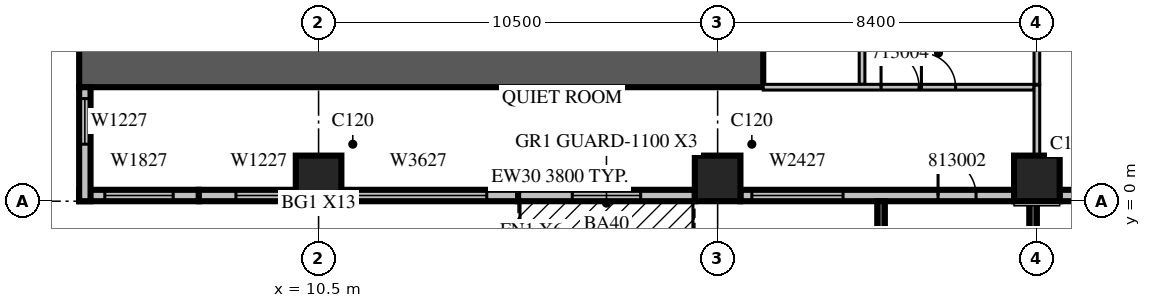
"""IFC4 building model, lengths in metres.
Left out: names, types, materials, properties, quantities, classifications, styles, units other than length and angle.
Written with IfcOpenShell. Run it as: python <this file> out.ifc"""

import sys

from ifc_helpers import new_model, si_unit, direction, frame, frame_2d, origin, origin_2d, place, context, subcontext, project, spatial, rectangle, extrude, source, transform, mapped, element, fill, save


model = new_model("IFC4")
c1 = context("Model", 3, precision=1e-05, world=origin(), true_north=direction((0.0, 1.0)))
c2 = subcontext(c1, "Body", "Model", "MODEL_VIEW")
j1 = project(units=[si_unit("LENGTHUNIT", "METRE"), si_unit("PLANEANGLEUNIT", "RADIAN")], contexts=[c1])
p1 = place(None, origin())
s1 = spatial("IfcSite", under=j1, at=p1, CompositionType="ELEMENT")
p2 = place(p1, origin())
s2 = spatial("IfcBuilding", under=s1, at=p2, CompositionType="ELEMENT")
p3 = place(p2, frame((0.0, 0.0, 65.7)))
s3 = spatial("IfcBuildingStorey", under=s2, at=p3, CompositionType="ELEMENT", Elevation=65.7)
m1 = source(origin(), c2, "Body", "SweptSolid", [
    extrude(rectangle(XDim=1.2, YDim=1.2, at=origin_2d()), origin(), (0.0, 0.0, 1.0), 4.2),
])
for number, where, z_axis, x_axis in (
    (1, (10.5, 0.6, 0.0), (0.0, 0.0, 1.0), (1.0, 0.0, 0.0)),
    (2, (21.0, 0.6, 0.0), (0.0, 0.0, 1.0), (1.0, 0.0, 0.0)),
    (3, (29.4, 0.6, 0.0), (0.0, 0.0, 1.0), (1.0, 0.0, 0.0)),
):
    element("IfcColumn", number, at=place(p3, frame(where, z_axis=z_axis, x_axis=x_axis)), inside=s3, PredefinedType="COLUMN", context=c2, shape_type="MappedRepresentation", body=[
        mapped(m1, transform((0.0, 0.0, 0.0), scale=1.0)),
    ])
m2 = source(origin(), c2, "Body", "SweptSolid", [
    extrude(rectangle(XDim=18.0, YDim=1.2, at=frame_2d((9.0, 0.0))), origin(), (0.0, 0.0, 1.0), 4.2),
])
p4 = place(p3, frame((4.2, 3.6, 0.0), z_axis=(0.0, 0.0, 1.0), x_axis=(1.0, 0.0, 0.0)))
e4 = element("IfcWall", 4, at=p4, inside=s3, PredefinedType="SHEAR", context=c2, shape_type="MappedRepresentation", body=[
    mapped(m2, transform((0.0, 0.0, 0.0), scale=1.0)),
])
m3 = source(origin(), c2, "Body", "SweptSolid", [
    extrude(rectangle(XDim=3.15, YDim=0.3, at=frame_2d((1.575, 0.0))), origin(), (0.0, 0.0, 1.0), 3.8),
])
p5 = place(p3, frame((4.2, 0.15, 0.0), z_axis=(0.0, 0.0, 1.0), x_axis=(1.0, 0.0, 0.0)))
e5 = element("IfcWall", 5, at=p5, inside=s3, PredefinedType="STANDARD", context=c2, shape_type="MappedRepresentation", body=[
    mapped(m3, transform((0.0, 0.0, 0.0), scale=1.0)),
])
m4 = source(origin(), c2, "Body", "SweptSolid", [
    extrude(rectangle(XDim=1.8, YDim=2.7, at=frame_2d((0.9, 1.35))), frame((0.0, 0.16, 0.0), z_axis=(0.0, -1.0, 0.0), x_axis=(1.0, 0.0, 0.0)), (0.0, 0.0, 1.0), 0.32),
])
p6 = place(p5, frame((0.675, 0.0, 0.6)))
e6 = element("IfcOpeningElement", 6, at=p6, cuts=e5, PredefinedType="OPENING", context=c2, shape_type="MappedRepresentation", body=[
    mapped(m4, transform((0.0, 0.0, 0.0), scale=1.0)),
])
m5 = source(origin(), c2, "Body", "SweptSolid", [
    extrude(rectangle(XDim=2.55, YDim=0.3, at=frame_2d((1.275, 0.0))), origin(), (0.0, 0.0, 1.0), 3.8),
])
p7 = place(p3, frame((7.35, 0.15, 0.0), z_axis=(0.0, 0.0, 1.0), x_axis=(1.0, 0.0, 0.0)))
e7 = element("IfcWall", 7, at=p7, inside=s3, PredefinedType="STANDARD", context=c2, shape_type="MappedRepresentation", body=[
    mapped(m5, transform((0.0, 0.0, 0.0), scale=1.0)),
])
m6 = source(origin(), c2, "Body", "SweptSolid", [
    extrude(rectangle(XDim=1.2, YDim=2.7, at=frame_2d((0.6, 1.35))), frame((0.0, 0.16, 0.0), z_axis=(0.0, -1.0, 0.0), x_axis=(1.0, 0.0, 0.0)), (0.0, 0.0, 1.0), 0.32),
])
p8 = place(p7, frame((0.975, 0.0, 0.6)))
e8 = element("IfcOpeningElement", 8, at=p8, cuts=e7, PredefinedType="OPENING", context=c2, shape_type="MappedRepresentation", body=[
    mapped(m6, transform((0.0, 0.0, 0.0), scale=1.0)),
])
m7 = source(origin(), c2, "Body", "SweptSolid", [
    extrude(rectangle(XDim=4.65, YDim=0.3, at=frame_2d((2.325, 0.0))), origin(), (0.0, 0.0, 1.0), 3.8),
])
p9 = place(p3, frame((11.1, 0.15, 0.0), z_axis=(0.0, 0.0, 1.0), x_axis=(1.0, 0.0, 0.0)))
e9 = element("IfcWall", 9, at=p9, inside=s3, PredefinedType="STANDARD", context=c2, shape_type="MappedRepresentation", body=[
    mapped(m7, transform((0.0, 0.0, 0.0), scale=1.0)),
])
m8 = source(origin(), c2, "Body", "SweptSolid", [
    extrude(rectangle(XDim=3.6, YDim=2.7, at=frame_2d((1.8, 1.35))), frame((0.0, 0.16, 0.0), z_axis=(0.0, -1.0, 0.0), x_axis=(1.0, 0.0, 0.0)), (0.0, 0.0, 1.0), 0.32),
])
p10 = place(p9, frame((0.225, 0.0, 0.6)))
e10 = element("IfcOpeningElement", 10, at=p10, cuts=e9, PredefinedType="OPENING", context=c2, shape_type="MappedRepresentation", body=[
    mapped(m8, transform((0.0, 0.0, 0.0), scale=1.0)),
])
p11 = place(p3, frame((15.75, 0.15, 0.0), z_axis=(0.0, 0.0, 1.0), x_axis=(1.0, 0.0, 0.0)))
e11 = element("IfcWall", 11, at=p11, inside=s3, PredefinedType="STANDARD", context=c2, shape_type="MappedRepresentation", body=[
    mapped(m7, transform((0.0, 0.0, 0.0), scale=1.0)),
])
m9 = source(origin(), c2, "Body", "SweptSolid", [
    extrude(rectangle(XDim=1.8, YDim=2.4, at=frame_2d((0.9, 1.2))), frame((0.0, 0.16, 0.0), z_axis=(0.0, -1.0, 0.0), x_axis=(1.0, 0.0, 0.0)), (0.0, 0.0, 1.0), 0.32),
])
p12 = place(p11, frame((1.425, 0.0, 0.0)))
e12 = element("IfcOpeningElement", 12, at=p12, cuts=e11, PredefinedType="OPENING", context=c2, shape_type="MappedRepresentation", body=[
    mapped(m9, transform((0.0, 0.0, 0.0), scale=1.0)),
])
m10 = source(origin(), c2, "Body", "SweptSolid", [
    extrude(rectangle(XDim=7.2, YDim=0.3, at=frame_2d((3.6, 0.0))), origin(), (0.0, 0.0, 1.0), 3.8),
])
p13 = place(p3, frame((21.6, 0.15, 0.0), z_axis=(0.0, 0.0, 1.0), x_axis=(1.0, 0.0, 0.0)))
e13 = element("IfcWall", 13, at=p13, inside=s3, PredefinedType="STANDARD", context=c2, shape_type="MappedRepresentation", body=[
    mapped(m10, transform((0.0, 0.0, 0.0), scale=1.0)),
])
m11 = source(origin(), c2, "Body", "SweptSolid", [
    extrude(rectangle(XDim=2.4, YDim=2.7, at=frame_2d((1.2, 1.35))), frame((0.0, 0.16, 0.0), z_axis=(0.0, -1.0, 0.0), x_axis=(1.0, 0.0, 0.0)), (0.0, 0.0, 1.0), 0.32),
])
p14 = place(p13, frame((0.3, 0.0, 0.6)))
e14 = element("IfcOpeningElement", 14, at=p14, cuts=e13, PredefinedType="OPENING", context=c2, shape_type="MappedRepresentation", body=[
    mapped(m11, transform((0.0, 0.0, 0.0), scale=1.0)),
])
m12 = source(origin(), c2, "Body", "SweptSolid", [
    extrude(rectangle(XDim=1.0, YDim=2.1, at=frame_2d((0.5, 1.05))), frame((0.0, 0.16, 0.0), z_axis=(0.0, -1.0, 0.0), x_axis=(1.0, 0.0, 0.0)), (0.0, 0.0, 1.0), 0.32),
])
p15 = place(p13, frame((5.2, 0.0, 0.0)))
e15 = element("IfcOpeningElement", 15, at=p15, cuts=e13, PredefinedType="OPENING", context=c2, shape_type="MappedRepresentation", body=[
    mapped(m12, transform((0.0, 0.0, 0.0), scale=1.0)),
])
p16 = place(p3, frame((30.0, 0.15, 0.0), z_axis=(0.0, 0.0, 1.0), x_axis=(1.0, 0.0, 0.0)))
e16 = element("IfcWall", 16, at=p16, inside=s3, PredefinedType="STANDARD", context=c2, shape_type="MappedRepresentation", body=[
    mapped(m10, transform((0.0, 0.0, 0.0), scale=1.0)),
])
m13 = source(origin(), c2, "Body", "SweptSolid", [
    extrude(rectangle(XDim=3.0, YDim=0.3, at=frame_2d((1.5, 0.0))), origin(), (0.0, 0.0, 1.0), 3.8),
])
p17 = place(p3, frame((4.35, 3.0, 0.0), z_axis=(0.0, 0.0, 1.0), x_axis=(0.0, -1.0, 0.0)))
e17 = element("IfcWall", 17, at=p17, inside=s3, PredefinedType="STANDARD", context=c2, shape_type="MappedRepresentation", body=[
    mapped(m13, transform((0.0, 0.0, 0.0), scale=1.0)),
])
p18 = place(p17, frame((0.3, 0.0, 0.6)))
e18 = element("IfcOpeningElement", 18, at=p18, cuts=e17, PredefinedType="OPENING", context=c2, shape_type="MappedRepresentation", body=[
    mapped(m6, transform((0.0, 0.0, 0.0), scale=1.0)),
])
m14 = source(origin(), c2, "Body", "SweptSolid", [
    extrude(rectangle(XDim=3.9, YDim=0.2, at=frame_2d((1.95, 0.0))), origin(), (0.0, 0.0, 1.0), 3.79),
])
p19 = place(p3, frame((25.3, 0.0, 0.0), z_axis=(0.0, 0.0, 1.0), x_axis=(0.0, -1.0, 0.0)))
e19 = element("IfcWall", 19, at=p19, inside=s3, PredefinedType="SOLIDWALL", context=c2, shape_type="MappedRepresentation", body=[
    mapped(m14, transform((0.0, 0.0, 0.0), scale=1.0)),
])
m15 = source(origin(), c2, "Body", "SweptSolid", [
    extrude(rectangle(XDim=2.4, YDim=2.7, at=frame_2d((1.2, 1.35))), frame((0.0, 0.11, 0.0), z_axis=(0.0, -1.0, 0.0), x_axis=(1.0, 0.0, 0.0)), (0.0, 0.0, 1.0), 0.22),
])
p20 = place(p19, frame((0.75, 0.0, 0.6)))
e20 = element("IfcOpeningElement", 20, at=p20, cuts=e19, PredefinedType="OPENING", context=c2, shape_type="MappedRepresentation", body=[
    mapped(m15, transform((0.0, 0.0, 0.0), scale=1.0)),
])
p21 = place(p3, frame((29.3, 0.0, 0.0), z_axis=(0.0, 0.0, 1.0), x_axis=(0.0, -1.0, 0.0)))
e21 = element("IfcWall", 21, at=p21, inside=s3, PredefinedType="SOLIDWALL", context=c2, shape_type="MappedRepresentation", body=[
    mapped(m14, transform((0.0, 0.0, 0.0), scale=1.0)),
])
p22 = place(p21, frame((0.75, 0.0, 0.6)))
e22 = element("IfcOpeningElement", 22, at=p22, cuts=e21, PredefinedType="OPENING", context=c2, shape_type="MappedRepresentation", body=[
    mapped(m15, transform((0.0, 0.0, 0.0), scale=1.0)),
])
m16 = source(origin(), c2, "Body", "SweptSolid", [
    extrude(rectangle(XDim=11.925, YDim=0.15, at=frame_2d((5.963, 0.0))), origin(), (0.0, 0.0, 1.0), 3.8),
])
p23 = place(p3, frame((24.8, 15.0, 0.0), z_axis=(0.0, 0.0, 1.0), x_axis=(0.0, -1.0, 0.0)))
e23 = element("IfcWall", 23, at=p23, inside=s3, PredefinedType="PARTITIONING", context=c2, shape_type="MappedRepresentation", body=[
    mapped(m16, transform((0.0, 0.0, 0.0), scale=1.0)),
])
m17 = source(origin(), c2, "Body", "SweptSolid", [
    extrude(rectangle(XDim=0.9, YDim=2.1, at=frame_2d((0.45, 1.05))), frame((0.0, 0.085, 0.0), z_axis=(0.0, -1.0, 0.0), x_axis=(1.0, 0.0, 0.0)), (0.0, 0.0, 1.0), 0.17),
])
p24 = place(p23, frame((7.162, 0.0, 0.0)))
e24 = element("IfcOpeningElement", 24, at=p24, cuts=e23, PredefinedType="OPENING", context=c2, shape_type="MappedRepresentation", body=[
    mapped(m17, transform((0.0, 0.0, 0.0), scale=1.0)),
])
p25 = place(p23, frame((0.325, 0.0, 0.0)))
e25 = element("IfcOpeningElement", 25, at=p25, cuts=e23, PredefinedType="OPENING", context=c2, shape_type="MappedRepresentation", body=[
    mapped(m17, transform((0.0, 0.0, 0.0), scale=1.0)),
])
m18 = source(origin(), c2, "Body", "SweptSolid", [
    extrude(rectangle(XDim=6.826, YDim=0.15, at=frame_2d((3.413, 0.0))), origin(), (0.0, 0.0, 1.0), 3.8),
])
p26 = place(p3, frame((29.4, 3.075, 0.0), z_axis=(0.0, 0.0, 1.0), x_axis=(0.0, 1.0, 0.0)))
e26 = element("IfcWall", 26, at=p26, inside=s3, PredefinedType="PARTITIONING", context=c2, shape_type="MappedRepresentation", body=[
    mapped(m18, transform((0.0, 0.0, 0.0), scale=1.0)),
])
m19 = source(origin(), c2, "Body", "SweptSolid", [
    extrude(rectangle(XDim=7.125, YDim=0.15, at=frame_2d((3.562, 0.0))), origin(), (0.0, 0.0, 1.0), 3.8),
])
p27 = place(p3, frame((22.2, 3.0, 0.0), z_axis=(0.0, 0.0, 1.0), x_axis=(1.0, 0.0, 0.0)))
e27 = element("IfcWall", 27, at=p27, inside=s3, PredefinedType="PARTITIONING", context=c2, shape_type="MappedRepresentation", body=[
    mapped(m19, transform((0.0, 0.0, 0.0), scale=1.0)),
])
m20 = source(origin(), c2, "Body", "SweptSolid", [
    extrude(rectangle(XDim=1.0, YDim=2.1, at=frame_2d((0.5, 1.05))), frame((0.0, 0.085, 0.0), z_axis=(0.0, -1.0, 0.0), x_axis=(1.0, 0.0, 0.0)), (0.0, 0.0, 1.0), 0.17),
])
p28 = place(p27, frame((3.1, 0.0, 0.0)))
e28 = element("IfcOpeningElement", 28, at=p28, cuts=e27, PredefinedType="OPENING", context=c2, shape_type="MappedRepresentation", body=[
    mapped(m20, transform((0.0, 0.0, 0.0), scale=1.0)),
])
p29 = place(p27, frame((4.162, 0.0, 0.0)))
e29 = element("IfcOpeningElement", 29, at=p29, cuts=e27, PredefinedType="OPENING", context=c2, shape_type="MappedRepresentation", body=[
    mapped(m17, transform((0.0, 0.0, 0.0), scale=1.0)),
])
m21 = source(origin(), c2, "Body", "SweptSolid", [
    extrude(rectangle(XDim=1.856, YDim=0.15, at=frame_2d((0.928, 0.0))), origin(), (0.0, 0.0, 1.0), 3.8),
])
p30 = place(p3, frame((29.4, 1.199, 0.0), z_axis=(0.0, 0.0, 1.0), x_axis=(0.0, 1.0, 0.0)))
e30 = element("IfcWall", 30, at=p30, inside=s3, PredefinedType="PARTITIONING", context=c2, shape_type="MappedRepresentation", body=[
    mapped(m21, transform((0.0, 0.0, 0.0), scale=1.0)),
])
m22 = source(origin(), c2, "Body", "SweptSolid", [
    extrude(rectangle(XDim=1.8, YDim=2.7, at=frame_2d((0.9, 1.35))), frame((0.0, 0.03, 0.0), z_axis=(0.0, -1.0, 0.0), x_axis=(1.0, 0.0, 0.0)), (0.0, 0.0, 1.0), 0.06),
])
p31 = place(p6, origin())
e31 = element("IfcWindow", 31, at=p31, inside=s3, PartitioningType="SINGLE_PANEL", PredefinedType="WINDOW", context=c2, shape_type="MappedRepresentation", body=[
    mapped(m22, transform((0.0, 0.0, 0.0), scale=1.0)),
])
fill(e6, e31)
m23 = source(origin(), c2, "Body", "SweptSolid", [
    extrude(rectangle(XDim=1.2, YDim=2.7, at=frame_2d((0.6, 1.35))), frame((0.0, 0.03, 0.0), z_axis=(0.0, -1.0, 0.0), x_axis=(1.0, 0.0, 0.0)), (0.0, 0.0, 1.0), 0.06),
])
p32 = place(p8, origin())
e32 = element("IfcWindow", 32, at=p32, inside=s3, PartitioningType="SINGLE_PANEL", PredefinedType="WINDOW", context=c2, shape_type="MappedRepresentation", body=[
    mapped(m23, transform((0.0, 0.0, 0.0), scale=1.0)),
])
fill(e8, e32)
m24 = source(origin(), c2, "Body", "SweptSolid", [
    extrude(rectangle(XDim=3.6, YDim=2.7, at=frame_2d((1.8, 1.35))), frame((0.0, 0.03, 0.0), z_axis=(0.0, -1.0, 0.0), x_axis=(1.0, 0.0, 0.0)), (0.0, 0.0, 1.0), 0.06),
])
p33 = place(p10, origin())
e33 = element("IfcWindow", 33, at=p33, inside=s3, PartitioningType="SINGLE_PANEL", PredefinedType="WINDOW", context=c2, shape_type="MappedRepresentation", body=[
    mapped(m24, transform((0.0, 0.0, 0.0), scale=1.0)),
])
fill(e10, e33)
m25 = source(origin(), c2, "Body", "SweptSolid", [
    extrude(rectangle(XDim=1.8, YDim=2.4, at=frame_2d((0.9, 1.2))), frame((0.0, 0.025, 0.0), z_axis=(0.0, -1.0, 0.0), x_axis=(1.0, 0.0, 0.0)), (0.0, 0.0, 1.0), 0.05),
])
p34 = place(p12, origin())
e34 = element("IfcDoor", 34, at=p34, inside=s3, OperationType="SLIDING_TO_LEFT", PredefinedType="DOOR", context=c2, shape_type="MappedRepresentation", body=[
    mapped(m25, transform((0.0, 0.0, 0.0), scale=1.0)),
])
fill(e12, e34)
m26 = source(origin(), c2, "Body", "SweptSolid", [
    extrude(rectangle(XDim=2.4, YDim=2.7, at=frame_2d((1.2, 1.35))), frame((0.0, 0.03, 0.0), z_axis=(0.0, -1.0, 0.0), x_axis=(1.0, 0.0, 0.0)), (0.0, 0.0, 1.0), 0.06),
])
p35 = place(p14, origin())
e35 = element("IfcWindow", 35, at=p35, inside=s3, PartitioningType="SINGLE_PANEL", PredefinedType="WINDOW", context=c2, shape_type="MappedRepresentation", body=[
    mapped(m26, transform((0.0, 0.0, 0.0), scale=1.0)),
])
fill(e14, e35)
p36 = place(p18, origin())
e36 = element("IfcWindow", 36, at=p36, inside=s3, PartitioningType="SINGLE_PANEL", PredefinedType="WINDOW", context=c2, shape_type="MappedRepresentation", body=[
    mapped(m23, transform((0.0, 0.0, 0.0), scale=1.0)),
])
fill(e18, e36)
m27 = source(origin(), c2, "Body", "SweptSolid", [
    extrude(rectangle(XDim=1.0, YDim=2.1, at=frame_2d((0.5, 1.05))), frame((0.0, 0.025, 0.0), z_axis=(0.0, -1.0, 0.0), x_axis=(1.0, 0.0, 0.0)), (0.0, 0.0, 1.0), 0.05),
])
p37 = place(p28, origin())
e37 = element("IfcDoor", 37, at=p37, inside=s3, OperationType="SINGLE_SWING_LEFT", PredefinedType="DOOR", context=c2, shape_type="MappedRepresentation", body=[
    mapped(m27, transform((0.0, 0.0, 0.0), scale=1.0)),
])
fill(e28, e37)
m28 = source(origin(), c2, "Body", "SweptSolid", [
    extrude(rectangle(XDim=0.9, YDim=2.1, at=frame_2d((0.45, 1.05))), frame((0.0, 0.025, 0.0), z_axis=(0.0, -1.0, 0.0), x_axis=(1.0, 0.0, 0.0)), (0.0, 0.0, 1.0), 0.05),
])
p38 = place(p29, origin())
e38 = element("IfcDoor", 38, at=p38, inside=s3, OperationType="SINGLE_SWING_LEFT", PredefinedType="DOOR", context=c2, shape_type="MappedRepresentation", body=[
    mapped(m28, transform((0.0, 0.0, 0.0), scale=1.0)),
])
fill(e29, e38)
p39 = place(p15, origin())
e39 = element("IfcDoor", 39, at=p39, inside=s3, OperationType="SINGLE_SWING_LEFT", PredefinedType="DOOR", context=c2, shape_type="MappedRepresentation", body=[
    mapped(m27, transform((0.0, 0.0, 0.0), scale=1.0)),
])
fill(e15, e39)
save(model, sys.argv[1])
